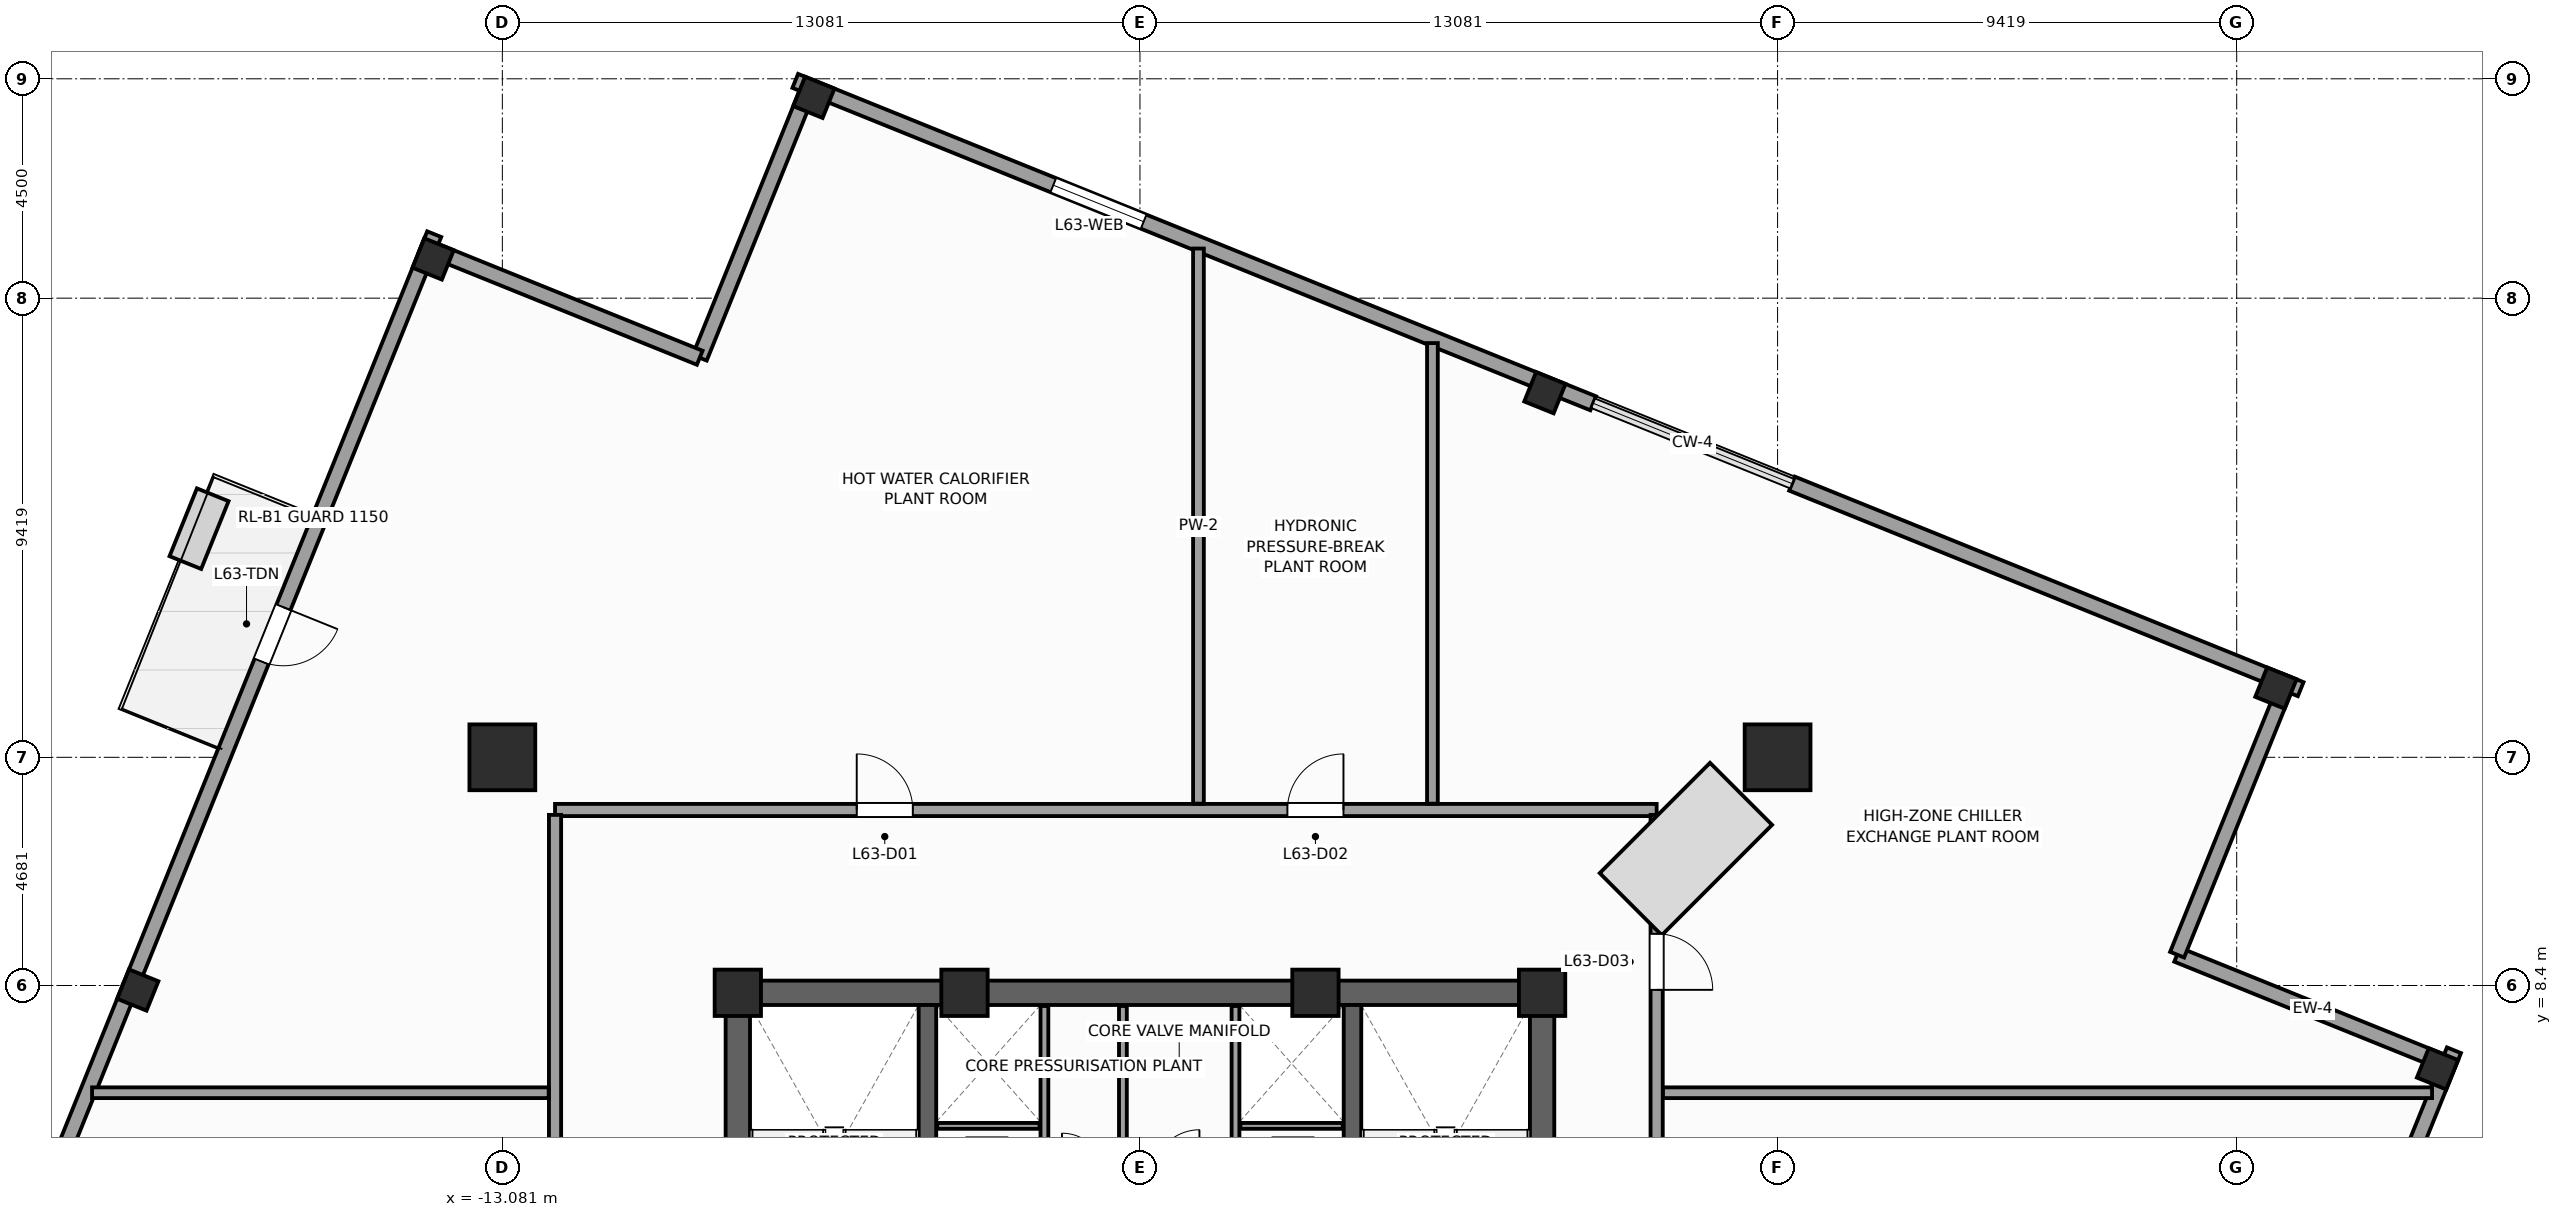
"""IFC4 building model, lengths in metres.
Left out: names, types, materials, properties, quantities, classifications, styles, units other than length and angle.
Written with IfcOpenShell. Run it as: python <this file> out.ifc"""

import sys

from ifc_helpers import new_model, si_unit, direction, frame, frame_2d, origin, origin_2d, place, context, subcontext, project, spatial, rectangle, extrude, source, transform, mapped, element, fill, save


model = new_model("IFC4")
c1 = context("Model", 3, precision=1e-05, world=origin(), true_north=direction((0.0, 1.0)))
c2 = subcontext(c1, "Body", "Model", "MODEL_VIEW")
j1 = project(units=[si_unit("LENGTHUNIT", "METRE"), si_unit("PLANEANGLEUNIT", "RADIAN")], contexts=[c1])
p1 = place(None, origin())
s1 = spatial("IfcSite", under=j1, at=p1, CompositionType="ELEMENT")
p2 = place(p1, origin())
s2 = spatial("IfcBuilding", under=s1, at=p2, CompositionType="ELEMENT")
p3 = place(p2, frame((0.0, 0.0, 260.2)))
s3 = spatial("IfcBuildingStorey", under=s2, at=p3, CompositionType="ELEMENT", Elevation=260.2)
p4 = place(p3, frame((-8.5, 8.25, 0.0), z_axis=(0.0, 0.0, 1.0), x_axis=(1.0, 0.0, 0.0)))
e1 = element("IfcWall", 1, at=p4, inside=s3, PredefinedType="SHEAR", context=c2, shape_type="SweptSolid", body=[
    extrude(rectangle(XDim=17.0, YDim=0.5, at=frame_2d((8.5, 0.0))), origin(), (0.0, 0.0, 1.0), 5.0),
])
p5 = place(p3, frame((-8.25, -8.0, 0.0), z_axis=(0.0, 0.0, 1.0), x_axis=(0.0, 1.0, 0.0)))
e2 = element("IfcWall", 2, at=p5, inside=s3, PredefinedType="SHEAR", context=c2, shape_type="SweptSolid", body=[
    extrude(rectangle(XDim=16.0, YDim=0.5, at=frame_2d((8.0, 0.0))), origin(), (0.0, 0.0, 1.0), 5.0),
])
p6 = place(p5, frame((4.69, 0.0, 0.0)))
e3 = element("IfcOpeningElement", 3, at=p6, cuts=e2, PredefinedType="OPENING", context=c2, shape_type="SweptSolid", body=[
    extrude(rectangle(XDim=1.3, YDim=2.2, at=frame_2d((0.65, 1.1))), frame((0.0, 0.26, 0.0), z_axis=(0.0, -1.0, 0.0), x_axis=(1.0, 0.0, 0.0)), (0.0, 0.0, 1.0), 0.52),
])
p7 = place(p3, frame((8.25, -8.0, 0.0), z_axis=(0.0, 0.0, 1.0), x_axis=(0.0, 1.0, 0.0)))
e4 = element("IfcWall", 4, at=p7, inside=s3, PredefinedType="SHEAR", context=c2, shape_type="SweptSolid", body=[
    extrude(rectangle(XDim=16.0, YDim=0.5, at=frame_2d((8.0, 0.0))), origin(), (0.0, 0.0, 1.0), 5.0),
])
p8 = place(p7, frame((4.69, 0.0, 0.0)))
e5 = element("IfcOpeningElement", 5, at=p8, cuts=e4, PredefinedType="OPENING", context=c2, shape_type="SweptSolid", body=[
    extrude(rectangle(XDim=1.3, YDim=2.2, at=frame_2d((0.65, 1.1))), frame((0.0, 0.26, 0.0), z_axis=(0.0, -1.0, 0.0), x_axis=(1.0, 0.0, 0.0)), (0.0, 0.0, 1.0), 0.52),
])
for number, where, z_axis, x_axis in (
    (6, (-4.36, -8.0, 0.0), (0.0, 0.0, 1.0), (0.0, 1.0, 0.0)),
    (7, (4.36, -8.0, 0.0), (0.0, 0.0, 1.0), (0.0, 1.0, 0.0)),
):
    element("IfcWall", number, at=place(p3, frame(where, z_axis=z_axis, x_axis=x_axis)), inside=s3, PredefinedType="SHEAR", context=c2, shape_type="SweptSolid", body=[
        extrude(rectangle(XDim=16.0, YDim=0.36, at=frame_2d((8.0, 0.0))), origin(), (0.0, 0.0, 1.0), 5.0),
    ])
m1 = source(origin(), c2, "Body", "SweptSolid", [
    extrude(rectangle(XDim=0.95, YDim=0.95, at=origin_2d()), origin(), (0.0, 0.0, 1.0), 5.0),
])
for number, where, z_axis, x_axis in (
    (8, (8.25, 8.25, 0.0), (0.0, 0.0, 1.0), (1.0, 0.0, 0.0)),
    (9, (-8.25, 8.25, 0.0), (0.0, 0.0, 1.0), (1.0, 0.0, 0.0)),
    (10, (-3.6, 8.25, 0.0), (0.0, 0.0, 1.0), (1.0, 0.0, 0.0)),
    (11, (3.6, 8.25, 0.0), (0.0, 0.0, 1.0), (1.0, 0.0, 0.0)),
):
    element("IfcColumn", number, at=place(p3, frame(where, z_axis=z_axis, x_axis=x_axis)), inside=s3, PredefinedType="PILASTER", context=c2, shape_type="MappedRepresentation", body=[
        mapped(m1, transform((0.0, 0.0, 0.0), scale=1.0)),
    ])
m2 = source(origin(), c2, "Body", "SweptSolid", [
    extrude(rectangle(XDim=1.35, YDim=1.35, at=origin_2d()), origin(), (0.0, 0.0, 1.0), 5.0),
])
for number, where, z_axis, x_axis in (
    (12, (13.081, 13.081, 0.0), (0.0, 0.0, 1.0), (1.0, 0.0, 0.0)),
    (13, (-13.081, 13.081, 0.0), (0.0, 0.0, 1.0), (1.0, 0.0, 0.0)),
):
    element("IfcColumn", number, at=place(p3, frame(where, z_axis=z_axis, x_axis=x_axis)), inside=s3, PredefinedType="COLUMN", context=c2, shape_type="MappedRepresentation", body=[
        mapped(m2, transform((0.0, 0.0, 0.0), scale=1.0)),
    ])
m3 = source(origin(), c2, "Body", "SweptSolid", [
    extrude(rectangle(XDim=0.65, YDim=0.65, at=origin_2d()), origin(), (0.0, 0.0, 1.0), 5.0),
])
for number, where, z_axis, x_axis in (
    (14, (26.62, 6.69, 0.0), (0.0, 0.0, 1.0), (0.375, 0.927, 0.0)),
    (15, (23.304, 14.501, 0.0), (0.0, 0.0, 1.0), (0.375, 0.927, 0.0)),
    (16, (8.307, 20.56, 0.0), (0.0, 0.0, 1.0), (0.375, 0.927, 0.0)),
    (17, (-6.69, 26.62, 0.0), (0.0, 0.0, 1.0), (0.375, 0.927, 0.0)),
    (18, (-14.501, 23.304, 0.0), (0.0, 0.0, 1.0), (0.375, 0.927, 0.0)),
    (19, (-20.56, 8.307, 0.0), (0.0, 0.0, 1.0), (0.375, 0.927, 0.0)),
):
    element("IfcColumn", number, at=place(p3, frame(where, z_axis=z_axis, x_axis=x_axis)), inside=s3, PredefinedType="COLUMN", context=c2, shape_type="MappedRepresentation", body=[
        mapped(m3, transform((0.0, 0.0, 0.0), scale=1.0)),
    ])
p9 = place(p3, frame((26.841, 6.784, 0.0), z_axis=(0.0, 0.0, 1.0), x_axis=(-0.927171722085, 0.374636620962, 0.0)))
e20 = element("IfcWall", 20, at=p9, inside=s3, PredefinedType="STANDARD", context=c2, shape_type="SweptSolid", body=[
    extrude(rectangle(XDim=6.0, YDim=0.31, at=frame_2d((3.0, 0.0))), origin(), (0.0, 0.0, 1.0), 4.05),
])
p10 = place(p3, frame((21.278, 9.032, 0.0), z_axis=(0.0, 0.0, 1.0), x_axis=(0.374602739196, 0.927185411764, 0.0)))
e21 = element("IfcWall", 21, at=p10, inside=s3, PredefinedType="STANDARD", context=c2, shape_type="SweptSolid", body=[
    extrude(rectangle(XDim=6.155, YDim=0.31, at=frame_2d((3.078, 0.0))), origin(), (0.0, 0.0, 1.0), 4.75),
])
p11 = place(p3, frame((-6.784, 26.841, 0.0), z_axis=(0.0, 0.0, 1.0), x_axis=(-0.374636620962, -0.927171722085, 0.0)))
e22 = element("IfcWall", 22, at=p11, inside=s3, PredefinedType="STANDARD", context=c2, shape_type="SweptSolid", body=[
    extrude(rectangle(XDim=6.0, YDim=0.31, at=frame_2d((3.0, 0.0))), origin(), (0.0, 0.0, 1.0), 4.05),
])
p12 = place(p3, frame((-9.032, 21.278, 0.0), z_axis=(0.0, 0.0, 1.0), x_axis=(-0.927185411764, 0.374602739196, 0.0)))
e23 = element("IfcWall", 23, at=p12, inside=s3, PredefinedType="STANDARD", context=c2, shape_type="SweptSolid", body=[
    extrude(rectangle(XDim=6.155, YDim=0.31, at=frame_2d((3.078, 0.0))), origin(), (0.0, 0.0, 1.0), 4.75),
])
p13 = place(p3, frame((20.718, -8.371, 0.0), z_axis=(0.0, 0.0, 1.0), x_axis=(0.374600710538, 0.927186231382, 0.0)))
e24 = element("IfcWall", 24, at=p13, inside=s3, PredefinedType="STANDARD", context=c2, shape_type="SweptSolid", body=[
    extrude(rectangle(XDim=16.655, YDim=0.31, at=frame_2d((8.328, 0.0))), origin(), (0.0, 0.0, 1.0), 4.15),
])
p14 = place(p13, frame((6.495, 0.0, 0.65)))
e25 = element("IfcOpeningElement", 25, at=p14, cuts=e24, PredefinedType="OPENING", context=c2, shape_type="SweptSolid", body=[
    extrude(rectangle(XDim=2.0, YDim=1.45, at=frame_2d((1.0, 0.725))), frame((0.0, 0.165, 0.0), z_axis=(0.0, -1.0, 0.0), x_axis=(1.0, 0.0, 0.0)), (0.0, 0.0, 1.0), 0.33),
])
p15 = place(p3, frame((23.813, 14.479, 0.0), z_axis=(0.0, 0.0, 1.0), x_axis=(-0.927178527544, 0.374619777991, 0.0)))
e26 = element("IfcWall", 26, at=p15, inside=s3, PredefinedType="STANDARD", context=c2, shape_type="SweptSolid", body=[
    extrude(rectangle(XDim=11.255, YDim=0.31, at=frame_2d((5.627, 0.0))), origin(), (0.0, 0.0, 1.0), 4.15),
])
p16 = place(p3, frame((9.298, 20.343, 0.0), z_axis=(0.0, 0.0, 1.0), x_axis=(-0.927183654967, 0.374607087443, 0.0)))
e27 = element("IfcWall", 27, at=p16, inside=s3, PredefinedType="STANDARD", context=c2, shape_type="SweptSolid", body=[
    extrude(rectangle(XDim=17.655, YDim=0.31, at=frame_2d((8.828, 0.0))), origin(), (0.0, 0.0, 1.0), 4.15),
])
p17 = place(p16, frame((9.946, 0.0, 0.65)))
e28 = element("IfcOpeningElement", 28, at=p17, cuts=e27, PredefinedType="OPENING", context=c2, shape_type="SweptSolid", body=[
    extrude(rectangle(XDim=2.0, YDim=1.45, at=frame_2d((1.0, 0.725))), frame((0.0, 0.165, 0.0), z_axis=(0.0, -1.0, 0.0), x_axis=(1.0, 0.0, 0.0)), (0.0, 0.0, 1.0), 0.33),
])
p18 = place(p3, frame((-14.479, 23.813, 0.0), z_axis=(0.0, 0.0, 1.0), x_axis=(-0.374618403537, -0.927179082881, 0.0)))
e29 = element("IfcWall", 29, at=p18, inside=s3, PredefinedType="STANDARD", context=c2, shape_type="SweptSolid", body=[
    extrude(rectangle(XDim=16.655, YDim=0.31, at=frame_2d((8.328, 0.0))), origin(), (0.0, 0.0, 1.0), 4.15),
])
p19 = place(p18, frame((8.255, 0.0, 0.0)))
e30 = element("IfcOpeningElement", 30, at=p19, cuts=e29, PredefinedType="OPENING", context=c2, shape_type="SweptSolid", body=[
    extrude(rectangle(XDim=1.2, YDim=2.3, at=frame_2d((0.6, 1.15))), frame((0.0, 0.165, 0.0), z_axis=(0.0, -1.0, 0.0), x_axis=(1.0, 0.0, 0.0)), (0.0, 0.0, 1.0), 0.33),
])
p20 = place(p3, frame((-20.718, 8.371, 0.0), z_axis=(0.0, 0.0, 1.0), x_axis=(-0.374600710538, -0.927186231382, 0.0)))
e31 = element("IfcWall", 31, at=p20, inside=s3, PredefinedType="STANDARD", context=c2, shape_type="SweptSolid", body=[
    extrude(rectangle(XDim=16.655, YDim=0.31, at=frame_2d((8.328, 0.0))), origin(), (0.0, 0.0, 1.0), 4.15),
])
p21 = place(p20, frame((6.495, 0.0, 0.65)))
e32 = element("IfcOpeningElement", 32, at=p21, cuts=e31, PredefinedType="OPENING", context=c2, shape_type="SweptSolid", body=[
    extrude(rectangle(XDim=2.0, YDim=1.45, at=frame_2d((1.0, 0.725))), frame((0.0, 0.165, 0.0), z_axis=(0.0, -1.0, 0.0), x_axis=(1.0, 0.0, 0.0)), (0.0, 0.0, 1.0), 0.33),
])
for number, where, z_axis, x_axis in (
    (33, (-1.96, 4.58, 0.0), (0.0, 0.0, 1.0), (0.0, 1.0, 0.0)),
    (34, (1.96, 4.58, 0.0), (0.0, 0.0, 1.0), (0.0, 1.0, 0.0)),
):
    element("IfcWall", number, at=place(p3, frame(where, z_axis=z_axis, x_axis=x_axis)), inside=s3, PredefinedType="PARTITIONING", context=c2, shape_type="SweptSolid", body=[
        extrude(rectangle(XDim=3.4, YDim=0.16, at=frame_2d((1.7, 0.0))), origin(), (0.0, 0.0, 1.0), 4.75),
    ])
for number, where, z_axis, x_axis in (
    (35, (-4.16, 5.52, 0.0), (0.0, 0.0, 1.0), (1.0, 0.0, 0.0)),
    (36, (2.06, 5.52, 0.0), (0.0, 0.0, 1.0), (1.0, 0.0, 0.0)),
):
    element("IfcWall", number, at=place(p3, frame(where, z_axis=z_axis, x_axis=x_axis)), inside=s3, PredefinedType="PARTITIONING", context=c2, shape_type="SweptSolid", body=[
        extrude(rectangle(XDim=2.1, YDim=0.12, at=frame_2d((1.05, 0.0))), origin(), (0.0, 0.0, 1.0), 4.75),
    ])
p22 = place(p3, frame((-0.35, 4.6, 0.0), z_axis=(0.0, 0.0, 1.0), x_axis=(0.0, 1.0, 0.0)))
e37 = element("IfcWall", 37, at=p22, inside=s3, PredefinedType="PARTITIONING", context=c2, shape_type="SweptSolid", body=[
    extrude(rectangle(XDim=3.38, YDim=0.16, at=frame_2d((1.69, 0.0))), origin(), (0.0, 0.0, 1.0), 4.75),
])
p23 = place(p3, frame((-12.0, 12.0, 0.0), z_axis=(0.0, 0.0, 1.0), x_axis=(1.0, 0.0, 0.0)))
e38 = element("IfcWall", 38, at=p23, inside=s3, PredefinedType="PARTITIONING", context=c2, shape_type="SweptSolid", body=[
    extrude(rectangle(XDim=22.6, YDim=0.25, at=frame_2d((11.3, 0.0))), origin(), (0.0, 0.0, 1.0), 4.75),
])
p24 = place(p23, frame((6.189, 0.0, 0.0)))
e39 = element("IfcOpeningElement", 39, at=p24, cuts=e38, PredefinedType="OPENING", context=c2, shape_type="SweptSolid", body=[
    extrude(rectangle(XDim=1.15, YDim=2.25, at=frame_2d((0.575, 1.125))), frame((0.0, 0.135, 0.0), z_axis=(0.0, -1.0, 0.0), x_axis=(1.0, 0.0, 0.0)), (0.0, 0.0, 1.0), 0.27),
])
p25 = place(p23, frame((15.025, 0.0, 0.0)))
e40 = element("IfcOpeningElement", 40, at=p25, cuts=e38, PredefinedType="OPENING", context=c2, shape_type="SweptSolid", body=[
    extrude(rectangle(XDim=1.15, YDim=2.25, at=frame_2d((0.575, 1.125))), frame((0.0, 0.135, 0.0), z_axis=(0.0, -1.0, 0.0), x_axis=(1.0, 0.0, 0.0)), (0.0, 0.0, 1.0), 0.27),
])
p26 = place(p3, frame((-12.0, -11.9, 0.0), z_axis=(0.0, 0.0, 1.0), x_axis=(0.0, 1.0, 0.0)))
e41 = element("IfcWall", 41, at=p26, inside=s3, PredefinedType="PARTITIONING", context=c2, shape_type="SweptSolid", body=[
    extrude(rectangle(XDim=23.8, YDim=0.25, at=frame_2d((11.9, 0.0))), origin(), (0.0, 0.0, 1.0), 4.75),
])
p27 = place(p26, frame((11.325, 0.0, 0.0)))
e42 = element("IfcOpeningElement", 42, at=p27, cuts=e41, PredefinedType="OPENING", context=c2, shape_type="SweptSolid", body=[
    extrude(rectangle(XDim=1.15, YDim=2.25, at=frame_2d((0.575, 1.125))), frame((0.0, 0.135, 0.0), z_axis=(0.0, -1.0, 0.0), x_axis=(1.0, 0.0, 0.0)), (0.0, 0.0, 1.0), 0.27),
])
p28 = place(p3, frame((10.6, -11.9, 0.0), z_axis=(0.0, 0.0, 1.0), x_axis=(0.0, 1.0, 0.0)))
e43 = element("IfcWall", 43, at=p28, inside=s3, PredefinedType="PARTITIONING", context=c2, shape_type="SweptSolid", body=[
    extrude(rectangle(XDim=23.8, YDim=0.25, at=frame_2d((11.9, 0.0))), origin(), (0.0, 0.0, 1.0), 4.75),
])
p29 = place(p28, frame((20.21, 0.0, 0.0)))
e44 = element("IfcOpeningElement", 44, at=p29, cuts=e43, PredefinedType="OPENING", context=c2, shape_type="SweptSolid", body=[
    extrude(rectangle(XDim=1.15, YDim=2.25, at=frame_2d((0.575, 1.125))), frame((0.0, 0.135, 0.0), z_axis=(0.0, -1.0, 0.0), x_axis=(1.0, 0.0, 0.0)), (0.0, 0.0, 1.0), 0.27),
])
p30 = place(p28, frame((11.325, 0.0, 0.0)))
e45 = element("IfcOpeningElement", 45, at=p30, cuts=e43, PredefinedType="OPENING", context=c2, shape_type="SweptSolid", body=[
    extrude(rectangle(XDim=1.15, YDim=2.25, at=frame_2d((0.575, 1.125))), frame((0.0, 0.135, 0.0), z_axis=(0.0, -1.0, 0.0), x_axis=(1.0, 0.0, 0.0)), (0.0, 0.0, 1.0), 0.27),
])
p31 = place(p3, frame((1.2, 12.13, 0.0), z_axis=(0.0, 0.0, 1.0), x_axis=(0.0, 1.0, 0.0)))
e46 = element("IfcWall", 46, at=p31, inside=s3, PredefinedType="PARTITIONING", context=c2, shape_type="SweptSolid", body=[
    extrude(rectangle(XDim=11.388, YDim=0.22, at=frame_2d((5.694, 0.0))), origin(), (0.0, 0.0, 1.0), 4.75),
])
p32 = place(p3, frame((6.0, 12.13, 0.0), z_axis=(0.0, 0.0, 1.0), x_axis=(0.0, 1.0, 0.0)))
e47 = element("IfcWall", 47, at=p32, inside=s3, PredefinedType="PARTITIONING", context=c2, shape_type="SweptSolid", body=[
    extrude(rectangle(XDim=9.449, YDim=0.22, at=frame_2d((4.724, 0.0))), origin(), (0.0, 0.0, 1.0), 4.75),
])
p33 = place(p3, frame((10.73, 6.2, 0.0), z_axis=(0.0, 0.0, 1.0), x_axis=(1.0, 0.0, 0.0)))
e48 = element("IfcWall", 48, at=p33, inside=s3, PredefinedType="PARTITIONING", context=c2, shape_type="SweptSolid", body=[
    extrude(rectangle(XDim=15.778, YDim=0.22, at=frame_2d((7.889, 0.0))), origin(), (0.0, 0.0, 1.0), 4.75),
])
p34 = place(p3, frame((-12.13, 6.2, 0.0), z_axis=(0.0, 0.0, 1.0), x_axis=(-1.0, 0.0, 0.0)))
e49 = element("IfcWall", 49, at=p34, inside=s3, PredefinedType="PARTITIONING", context=c2, shape_type="SweptSolid", body=[
    extrude(rectangle(XDim=9.368, YDim=0.22, at=frame_2d((4.684, 0.0))), origin(), (0.0, 0.0, 1.0), 4.75),
])
m4 = source(origin(), c2, "Body", "SweptSolid", [
    extrude(rectangle(XDim=2.0, YDim=1.45, at=frame_2d((1.0, 0.725))), frame((0.0, 0.03, 0.0), z_axis=(0.0, -1.0, 0.0), x_axis=(1.0, 0.0, 0.0)), (0.0, 0.0, 1.0), 0.06),
])
p35 = place(p17, origin())
e50 = element("IfcWindow", 50, at=p35, inside=s3, PartitioningType="SINGLE_PANEL", PredefinedType="WINDOW", context=c2, shape_type="MappedRepresentation", body=[
    mapped(m4, transform((0.0, 0.0, 0.0), scale=1.0)),
])
fill(e28, e50)
m5 = source(origin(), c2, "Body", "SweptSolid", [
    extrude(rectangle(XDim=1.2, YDim=2.3, at=frame_2d((0.6, 1.15))), frame((0.0, 0.025, 0.0), z_axis=(0.0, -1.0, 0.0), x_axis=(1.0, 0.0, 0.0)), (0.0, 0.0, 1.0), 0.05),
])
p36 = place(p19, origin())
e51 = element("IfcDoor", 51, at=p36, inside=s3, OperationType="SINGLE_SWING_LEFT", PredefinedType="DOOR", context=c2, shape_type="MappedRepresentation", body=[
    mapped(m5, transform((0.0, 0.0, 0.0), scale=1.0)),
])
fill(e30, e51)
m6 = source(origin(), c2, "Body", "SweptSolid", [
    extrude(rectangle(XDim=1.15, YDim=2.25, at=frame_2d((0.575, 1.125))), frame((0.0, 0.025, 0.0), z_axis=(0.0, -1.0, 0.0), x_axis=(1.0, 0.0, 0.0)), (0.0, 0.0, 1.0), 0.05),
])
p37 = place(p24, origin())
e52 = element("IfcDoor", 52, at=p37, inside=s3, OperationType="SINGLE_SWING_LEFT", PredefinedType="DOOR", context=c2, shape_type="MappedRepresentation", body=[
    mapped(m6, transform((0.0, 0.0, 0.0), scale=1.0)),
])
fill(e39, e52)
p38 = place(p25, origin())
e53 = element("IfcDoor", 53, at=p38, inside=s3, OperationType="SINGLE_SWING_RIGHT", PredefinedType="DOOR", context=c2, shape_type="MappedRepresentation", body=[
    mapped(m6, transform((0.0, 0.0, 0.0), scale=1.0)),
])
fill(e40, e53)
p39 = place(p29, frame((1.15, 0.0, 0.0), z_axis=(0.0, 0.0, 1.0), x_axis=(-1.0, 0.0, 0.0)))
e54 = element("IfcDoor", 54, at=p39, inside=s3, OperationType="SINGLE_SWING_LEFT", PredefinedType="DOOR", context=c2, shape_type="MappedRepresentation", body=[
    mapped(m6, transform((0.0, 0.0, 0.0), scale=1.0)),
])
fill(e44, e54)
save(model, sys.argv[1])
